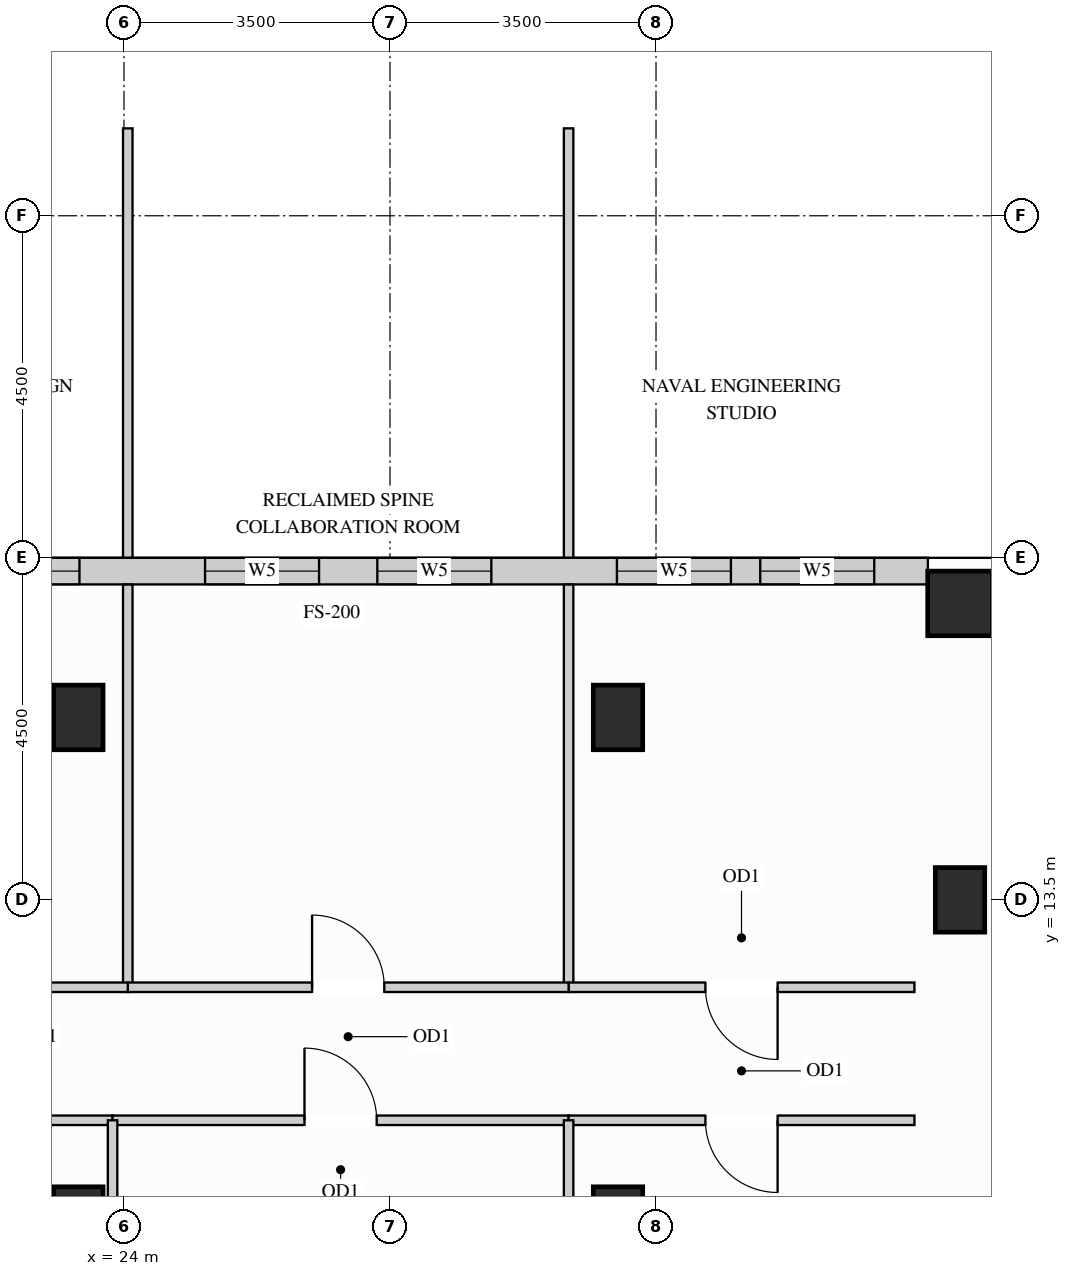
"""IFC4 building model, lengths in metres.
Left out: names, types, materials, properties, quantities, classifications, styles, units other than length and angle.
Written with IfcOpenShell. Run it as: python <this file> out.ifc"""

import sys

from ifc_helpers import new_model, si_unit, direction, frame, frame_2d, origin, origin_2d, place, context, subcontext, project, spatial, rectangle, extrude, source, transform, mapped, element, fill, save


model = new_model("IFC4")
c1 = context("Model", 3, precision=1e-05, world=origin(), true_north=direction((0.0, 1.0)))
c2 = subcontext(c1, "Body", "Model", "MODEL_VIEW")
j1 = project(units=[si_unit("LENGTHUNIT", "METRE"), si_unit("PLANEANGLEUNIT", "RADIAN")], contexts=[c1])
p1 = place(None, origin())
s1 = spatial("IfcSite", under=j1, at=p1, CompositionType="ELEMENT")
p2 = place(p1, origin())
s2 = spatial("IfcBuilding", under=s1, at=p2, CompositionType="ELEMENT")
p3 = place(p2, frame((0.0, 0.0, 219.6)))
s3 = spatial("IfcBuildingStorey", under=s2, at=p3, CompositionType="ELEMENT", Elevation=219.6)
m1 = source(origin(), c2, "Body", "SweptSolid", [
    extrude(rectangle(XDim=0.65, YDim=0.85, at=origin_2d()), origin(), (0.0, 0.0, 1.0), 3.4),
])
for number, where, z_axis, x_axis in (
    (1, (35.0, 13.5, 0.0), (0.0, 0.0, 1.0), (1.0, 0.0, 0.0)),
    (2, (23.4, 15.9, 0.0), (0.0, 0.0, 1.0), (1.0, 0.0, 0.0)),
    (3, (23.4, 9.3, 0.0), (0.0, 0.0, 1.0), (1.0, 0.0, 0.0)),
    (4, (30.5, 15.9, 0.0), (0.0, 0.0, 1.0), (1.0, 0.0, 0.0)),
    (5, (30.5, 9.3, 0.0), (0.0, 0.0, 1.0), (1.0, 0.0, 0.0)),
):
    element("IfcColumn", number, at=place(p3, frame(where, z_axis=z_axis, x_axis=x_axis)), inside=s3, PredefinedType="COLUMN", context=c2, shape_type="MappedRepresentation", body=[
        mapped(m1, transform((0.0, 0.0, 0.0), x_axis=(1.0, 0.0, 0.0), y_axis=(0.0, 1.0, 0.0), z_axis=(0.0, 0.0, 1.0))),
    ])
m2 = source(origin(), c2, "Body", "SweptSolid", [
    extrude(rectangle(XDim=0.85, YDim=0.85, at=origin_2d()), origin(), (0.0, 0.0, 1.0), 3.4),
])
p4 = place(p3, frame((35.0, 17.4, 0.0), z_axis=(0.0, 0.0, 1.0), x_axis=(1.0, 0.0, 0.0)))
e6 = element("IfcColumn", 6, at=p4, inside=s3, PredefinedType="COLUMN", context=c2, shape_type="MappedRepresentation", body=[
    mapped(m2, transform((0.0, 0.0, 0.0), x_axis=(1.0, 0.0, 0.0), y_axis=(0.0, 1.0, 0.0), z_axis=(0.0, 0.0, 1.0))),
])
p5 = place(p3, frame((34.577, 17.825, 0.0), z_axis=(0.0, 0.0, 1.0), x_axis=(-1.0, 0.0, 0.0)))
e7 = element("IfcWall", 7, at=p5, inside=s3, PredefinedType="SOLIDWALL", context=c2, shape_type="SweptSolid", body=[
    extrude(rectangle(XDim=15.254, YDim=0.35, at=frame_2d((7.627, 0.0))), origin(), (0.0, 0.0, 1.0), 3.385),
])
p6 = place(p5, frame((0.706, 0.0, 0.78)))
e8 = element("IfcOpeningElement", 8, at=p6, cuts=e7, PredefinedType="OPENING", context=c2, shape_type="SweptSolid", body=[
    extrude(rectangle(XDim=1.5, YDim=2.0, at=frame_2d((0.75, 1.0))), frame((0.0, 0.185, 0.0), z_axis=(0.0, -1.0, 0.0), x_axis=(1.0, 0.0, 0.0)), (0.0, 0.0, 1.0), 0.37),
])
p7 = place(p5, frame((2.591, 0.0, 0.78)))
e9 = element("IfcOpeningElement", 9, at=p7, cuts=e7, PredefinedType="OPENING", context=c2, shape_type="SweptSolid", body=[
    extrude(rectangle(XDim=1.5, YDim=2.0, at=frame_2d((0.75, 1.0))), frame((0.0, 0.185, 0.0), z_axis=(0.0, -1.0, 0.0), x_axis=(1.0, 0.0, 0.0)), (0.0, 0.0, 1.0), 0.37),
])
p8 = place(p5, frame((5.744, 0.0, 0.78)))
e10 = element("IfcOpeningElement", 10, at=p8, cuts=e7, PredefinedType="OPENING", context=c2, shape_type="SweptSolid", body=[
    extrude(rectangle(XDim=1.5, YDim=2.0, at=frame_2d((0.75, 1.0))), frame((0.0, 0.185, 0.0), z_axis=(0.0, -1.0, 0.0), x_axis=(1.0, 0.0, 0.0)), (0.0, 0.0, 1.0), 0.37),
])
p9 = place(p5, frame((8.01, 0.0, 0.78)))
e11 = element("IfcOpeningElement", 11, at=p9, cuts=e7, PredefinedType="OPENING", context=c2, shape_type="SweptSolid", body=[
    extrude(rectangle(XDim=1.5, YDim=2.0, at=frame_2d((0.75, 1.0))), frame((0.0, 0.185, 0.0), z_axis=(0.0, -1.0, 0.0), x_axis=(1.0, 0.0, 0.0)), (0.0, 0.0, 1.0), 0.37),
])
p10 = place(p5, frame((11.163, 0.0, 0.78)))
e12 = element("IfcOpeningElement", 12, at=p10, cuts=e7, PredefinedType="OPENING", context=c2, shape_type="SweptSolid", body=[
    extrude(rectangle(XDim=1.5, YDim=2.0, at=frame_2d((0.75, 1.0))), frame((0.0, 0.185, 0.0), z_axis=(0.0, -1.0, 0.0), x_axis=(1.0, 0.0, 0.0)), (0.0, 0.0, 1.0), 0.37),
])
p11 = place(p5, frame((13.048, 0.0, 0.78)))
e13 = element("IfcOpeningElement", 13, at=p11, cuts=e7, PredefinedType="OPENING", context=c2, shape_type="SweptSolid", body=[
    extrude(rectangle(XDim=1.5, YDim=2.0, at=frame_2d((0.75, 1.0))), frame((0.0, 0.185, 0.0), z_axis=(0.0, -1.0, 0.0), x_axis=(1.0, 0.0, 0.0)), (0.0, 0.0, 1.0), 0.37),
])
m3 = source(origin(), c2, "Body", "SweptSolid", [
    extrude(rectangle(XDim=5.298, YDim=0.125, at=frame_2d((2.649, 0.0))), origin(), (0.0, 0.0, 1.0), 3.385),
])
p12 = place(p3, frame((24.05, 12.35, 0.0), z_axis=(0.0, 0.0, 1.0), x_axis=(0.0, 1.0, 0.0)))
e14 = element("IfcWall", 14, at=p12, inside=s3, PredefinedType="PARTITIONING", context=c2, shape_type="MappedRepresentation", body=[
    mapped(m3, transform((0.0, 0.0, 0.0), x_axis=(1.0, 0.0, 0.0), y_axis=(0.0, 1.0, 0.0), z_axis=(0.0, 0.0, 1.0))),
])
m4 = source(origin(), c2, "Body", "SweptSolid", [
    extrude(rectangle(XDim=5.648, YDim=0.125, at=frame_2d((2.824, 0.0))), origin(), (0.0, 0.0, 1.0), 3.385),
])
p13 = place(p3, frame((24.05, 18.002, 0.0), z_axis=(0.0, 0.0, 1.0), x_axis=(0.0, 1.0, 0.0)))
e15 = element("IfcWall", 15, at=p13, inside=s3, PredefinedType="PARTITIONING", context=c2, shape_type="MappedRepresentation", body=[
    mapped(m4, transform((0.0, 0.0, 0.0), x_axis=(1.0, 0.0, 0.0), y_axis=(0.0, 1.0, 0.0), z_axis=(0.0, 0.0, 1.0))),
])
p14 = place(p3, frame((29.85, 12.35, 0.0), z_axis=(0.0, 0.0, 1.0), x_axis=(0.0, 1.0, 0.0)))
e16 = element("IfcWall", 16, at=p14, inside=s3, PredefinedType="PARTITIONING", context=c2, shape_type="MappedRepresentation", body=[
    mapped(m3, transform((0.0, 0.0, 0.0), x_axis=(1.0, 0.0, 0.0), y_axis=(0.0, 1.0, 0.0), z_axis=(0.0, 0.0, 1.0))),
])
p15 = place(p3, frame((29.85, 18.002, 0.0), z_axis=(0.0, 0.0, 1.0), x_axis=(0.0, 1.0, 0.0)))
e17 = element("IfcWall", 17, at=p15, inside=s3, PredefinedType="PARTITIONING", context=c2, shape_type="MappedRepresentation", body=[
    mapped(m4, transform((0.0, 0.0, 0.0), x_axis=(1.0, 0.0, 0.0), y_axis=(0.0, 1.0, 0.0), z_axis=(0.0, 0.0, 1.0))),
])
p16 = place(p3, frame((29.85, 12.35, 0.0), z_axis=(0.0, 0.0, 1.0), x_axis=(1.0, 0.0, 0.0)))
e18 = element("IfcWall", 18, at=p16, inside=s3, PredefinedType="PARTITIONING", context=c2, shape_type="SweptSolid", body=[
    extrude(rectangle(XDim=4.55, YDim=0.125, at=frame_2d((2.275, 0.0))), origin(), (0.0, 0.0, 1.0), 3.385),
])
p17 = place(p16, frame((1.8, 0.0, 0.0)))
e19 = element("IfcOpeningElement", 19, at=p17, cuts=e18, PredefinedType="OPENING", context=c2, shape_type="SweptSolid", body=[
    extrude(rectangle(XDim=0.95, YDim=2.15, at=frame_2d((0.475, 1.075))), frame((0.0, 0.073, 0.0), z_axis=(0.0, -1.0, 0.0), x_axis=(1.0, 0.0, 0.0)), (0.0, 0.0, 1.0), 0.145),
])
p18 = place(p3, frame((24.05, 12.35, 0.0), z_axis=(0.0, 0.0, 1.0), x_axis=(1.0, 0.0, 0.0)))
e20 = element("IfcWall", 20, at=p18, inside=s3, PredefinedType="PARTITIONING", context=c2, shape_type="SweptSolid", body=[
    extrude(rectangle(XDim=5.8, YDim=0.125, at=frame_2d((2.9, 0.0))), origin(), (0.0, 0.0, 1.0), 3.385),
])
p19 = place(p18, frame((2.425, 0.0, 0.0)))
e21 = element("IfcOpeningElement", 21, at=p19, cuts=e20, PredefinedType="OPENING", context=c2, shape_type="SweptSolid", body=[
    extrude(rectangle(XDim=0.95, YDim=2.15, at=frame_2d((0.475, 1.075))), frame((0.0, 0.073, 0.0), z_axis=(0.0, -1.0, 0.0), x_axis=(1.0, 0.0, 0.0)), (0.0, 0.0, 1.0), 0.145),
])
p20 = place(p3, frame((19.5, 12.35, 0.0), z_axis=(0.0, 0.0, 1.0), x_axis=(1.0, 0.0, 0.0)))
e22 = element("IfcWall", 22, at=p20, inside=s3, PredefinedType="PARTITIONING", context=c2, shape_type="SweptSolid", body=[
    extrude(rectangle(XDim=4.55, YDim=0.125, at=frame_2d((2.275, 0.0))), origin(), (0.0, 0.0, 1.0), 3.385),
])
p21 = place(p20, frame((1.8, 0.0, 0.0)))
e23 = element("IfcOpeningElement", 23, at=p21, cuts=e22, PredefinedType="OPENING", context=c2, shape_type="SweptSolid", body=[
    extrude(rectangle(XDim=0.95, YDim=2.15, at=frame_2d((0.475, 1.075))), frame((0.0, 0.073, 0.0), z_axis=(0.0, -1.0, 0.0), x_axis=(1.0, 0.0, 0.0)), (0.0, 0.0, 1.0), 0.145),
])
p22 = place(p3, frame((19.5, 10.6, 0.0), z_axis=(0.0, 0.0, 1.0), x_axis=(1.0, 0.0, 0.0)))
e24 = element("IfcWall", 24, at=p22, inside=s3, PredefinedType="PARTITIONING", context=c2, shape_type="SweptSolid", body=[
    extrude(rectangle(XDim=4.35, YDim=0.125, at=frame_2d((2.175, 0.0))), origin(), (0.0, 0.0, 1.0), 3.385),
])
p23 = place(p22, frame((1.7, 0.0, 0.0)))
e25 = element("IfcOpeningElement", 25, at=p23, cuts=e24, PredefinedType="OPENING", context=c2, shape_type="SweptSolid", body=[
    extrude(rectangle(XDim=0.95, YDim=2.15, at=frame_2d((0.475, 1.075))), frame((0.0, 0.073, 0.0), z_axis=(0.0, -1.0, 0.0), x_axis=(1.0, 0.0, 0.0)), (0.0, 0.0, 1.0), 0.145),
])
p24 = place(p3, frame((23.85, 10.6, 0.0), z_axis=(0.0, 0.0, 1.0), x_axis=(1.0, 0.0, 0.0)))
e26 = element("IfcWall", 26, at=p24, inside=s3, PredefinedType="PARTITIONING", context=c2, shape_type="SweptSolid", body=[
    extrude(rectangle(XDim=6.0, YDim=0.125, at=frame_2d((3.0, 0.0))), origin(), (0.0, 0.0, 1.0), 3.385),
])
p25 = place(p24, frame((2.525, 0.0, 0.0)))
e27 = element("IfcOpeningElement", 27, at=p25, cuts=e26, PredefinedType="OPENING", context=c2, shape_type="SweptSolid", body=[
    extrude(rectangle(XDim=0.95, YDim=2.15, at=frame_2d((0.475, 1.075))), frame((0.0, 0.073, 0.0), z_axis=(0.0, -1.0, 0.0), x_axis=(1.0, 0.0, 0.0)), (0.0, 0.0, 1.0), 0.145),
])
p26 = place(p3, frame((29.85, 10.6, 0.0), z_axis=(0.0, 0.0, 1.0), x_axis=(1.0, 0.0, 0.0)))
e28 = element("IfcWall", 28, at=p26, inside=s3, PredefinedType="PARTITIONING", context=c2, shape_type="SweptSolid", body=[
    extrude(rectangle(XDim=4.55, YDim=0.125, at=frame_2d((2.275, 0.0))), origin(), (0.0, 0.0, 1.0), 3.385),
])
p27 = place(p26, frame((1.8, 0.0, 0.0)))
e29 = element("IfcOpeningElement", 29, at=p27, cuts=e28, PredefinedType="OPENING", context=c2, shape_type="SweptSolid", body=[
    extrude(rectangle(XDim=0.95, YDim=2.15, at=frame_2d((0.475, 1.075))), frame((0.0, 0.073, 0.0), z_axis=(0.0, -1.0, 0.0), x_axis=(1.0, 0.0, 0.0)), (0.0, 0.0, 1.0), 0.145),
])
m5 = source(origin(), c2, "Body", "SweptSolid", [
    extrude(rectangle(XDim=5.748, YDim=0.125, at=frame_2d((2.874, 0.0))), origin(), (0.0, 0.0, 1.0), 3.385),
])
for number, where, z_axis, x_axis in (
    (30, (23.85, 4.852, 0.0), (0.0, 0.0, 1.0), (0.0, 1.0, 0.0)),
    (31, (29.85, 4.852, 0.0), (0.0, 0.0, 1.0), (0.0, 1.0, 0.0)),
):
    element("IfcWall", number, at=place(p3, frame(where, z_axis=z_axis, x_axis=x_axis)), inside=s3, PredefinedType="PARTITIONING", context=c2, shape_type="MappedRepresentation", body=[
        mapped(m5, transform((0.0, 0.0, 0.0), x_axis=(1.0, 0.0, 0.0), y_axis=(0.0, 1.0, 0.0), z_axis=(0.0, 0.0, 1.0))),
    ])
m6 = source(origin(), c2, "Body", "SweptSolid", [
    extrude(rectangle(XDim=0.95, YDim=2.15, at=frame_2d((0.475, 1.075))), frame((0.0, 0.025, 0.0), z_axis=(0.0, -1.0, 0.0), x_axis=(1.0, 0.0, 0.0)), (0.0, 0.0, 1.0), 0.05),
])
p28 = place(p19, origin())
e32 = element("IfcDoor", 32, at=p28, inside=s3, OperationType="SINGLE_SWING_LEFT", PredefinedType="DOOR", context=c2, shape_type="MappedRepresentation", body=[
    mapped(m6, transform((0.0, 0.0, 0.0), x_axis=(1.0, 0.0, 0.0), y_axis=(0.0, 1.0, 0.0), z_axis=(0.0, 0.0, 1.0))),
])
fill(e21, e32)
p29 = place(p17, origin())
e33 = element("IfcDoor", 33, at=p29, inside=s3, OperationType="SINGLE_SWING_RIGHT", PredefinedType="DOOR", context=c2, shape_type="MappedRepresentation", body=[
    mapped(m6, transform((0.0, 0.0, 0.0), x_axis=(1.0, 0.0, 0.0), y_axis=(0.0, 1.0, 0.0), z_axis=(0.0, 0.0, 1.0))),
])
fill(e19, e33)
p30 = place(p25, origin())
e34 = element("IfcDoor", 34, at=p30, inside=s3, OperationType="SINGLE_SWING_LEFT", PredefinedType="DOOR", context=c2, shape_type="MappedRepresentation", body=[
    mapped(m6, transform((0.0, 0.0, 0.0), x_axis=(1.0, 0.0, 0.0), y_axis=(0.0, 1.0, 0.0), z_axis=(0.0, 0.0, 1.0))),
])
fill(e27, e34)
p31 = place(p27, origin())
e35 = element("IfcDoor", 35, at=p31, inside=s3, OperationType="SINGLE_SWING_RIGHT", PredefinedType="DOOR", context=c2, shape_type="MappedRepresentation", body=[
    mapped(m6, transform((0.0, 0.0, 0.0), x_axis=(1.0, 0.0, 0.0), y_axis=(0.0, 1.0, 0.0), z_axis=(0.0, 0.0, 1.0))),
])
fill(e29, e35)
m7 = source(origin(), c2, "Body", "SweptSolid", [
    extrude(rectangle(XDim=1.5, YDim=2.0, at=frame_2d((0.75, 1.0))), frame((0.0, 0.03, 0.0), z_axis=(0.0, -1.0, 0.0), x_axis=(1.0, 0.0, 0.0)), (0.0, 0.0, 1.0), 0.06),
])
p32 = place(p6, origin())
e36 = element("IfcWindow", 36, at=p32, inside=s3, PartitioningType="SINGLE_PANEL", PredefinedType="WINDOW", context=c2, shape_type="MappedRepresentation", body=[
    mapped(m7, transform((0.0, 0.0, 0.0), x_axis=(1.0, 0.0, 0.0), y_axis=(0.0, 1.0, 0.0), z_axis=(0.0, 0.0, 1.0))),
])
fill(e8, e36)
p33 = place(p7, origin())
e37 = element("IfcWindow", 37, at=p33, inside=s3, PartitioningType="SINGLE_PANEL", PredefinedType="WINDOW", context=c2, shape_type="MappedRepresentation", body=[
    mapped(m7, transform((0.0, 0.0, 0.0), x_axis=(1.0, 0.0, 0.0), y_axis=(0.0, 1.0, 0.0), z_axis=(0.0, 0.0, 1.0))),
])
fill(e9, e37)
p34 = place(p8, origin())
e38 = element("IfcWindow", 38, at=p34, inside=s3, PartitioningType="SINGLE_PANEL", PredefinedType="WINDOW", context=c2, shape_type="MappedRepresentation", body=[
    mapped(m7, transform((0.0, 0.0, 0.0), x_axis=(1.0, 0.0, 0.0), y_axis=(0.0, 1.0, 0.0), z_axis=(0.0, 0.0, 1.0))),
])
fill(e10, e38)
p35 = place(p9, origin())
e39 = element("IfcWindow", 39, at=p35, inside=s3, PartitioningType="SINGLE_PANEL", PredefinedType="WINDOW", context=c2, shape_type="MappedRepresentation", body=[
    mapped(m7, transform((0.0, 0.0, 0.0), x_axis=(1.0, 0.0, 0.0), y_axis=(0.0, 1.0, 0.0), z_axis=(0.0, 0.0, 1.0))),
])
fill(e11, e39)
p36 = place(p10, origin())
e40 = element("IfcWindow", 40, at=p36, inside=s3, PartitioningType="SINGLE_PANEL", PredefinedType="WINDOW", context=c2, shape_type="MappedRepresentation", body=[
    mapped(m7, transform((0.0, 0.0, 0.0), x_axis=(1.0, 0.0, 0.0), y_axis=(0.0, 1.0, 0.0), z_axis=(0.0, 0.0, 1.0))),
])
fill(e12, e40)
save(model, sys.argv[1])
